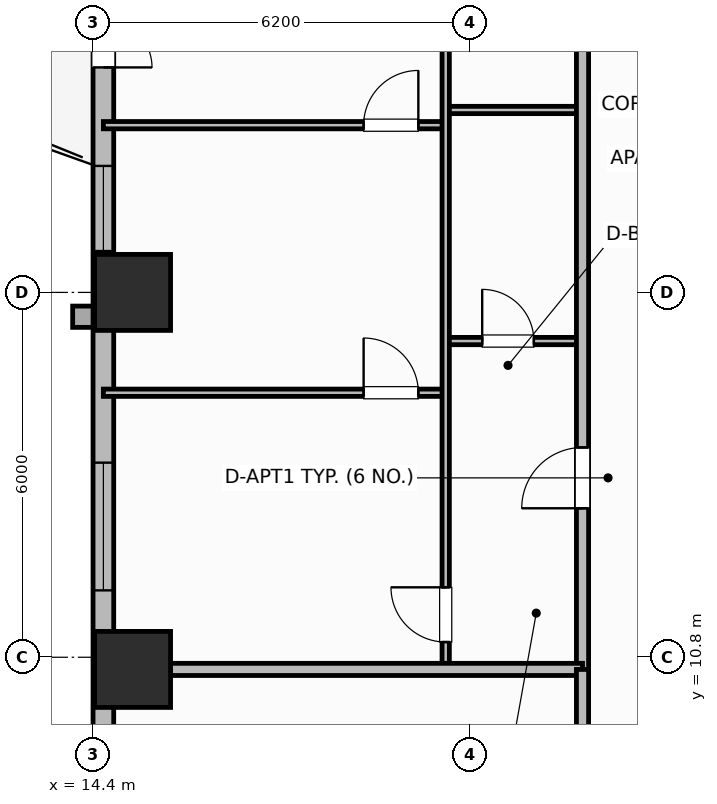
"""IFC4 building model, lengths in metres.
Left out: names, types, materials, properties, quantities, classifications, styles, units other than length and angle.
Written with IfcOpenShell. Run it as: python <this file> out.ifc"""

import sys

from ifc_helpers import new_model, si_unit, direction, frame, frame_2d, origin, origin_2d, place, context, subcontext, project, spatial, rectangle, extrude, element, fill, save


model = new_model("IFC4")
c1 = context("Model", 3, precision=1e-05, world=origin(), true_north=direction((0.0, 1.0)))
c2 = subcontext(c1, "Body", "Model", "MODEL_VIEW")
j1 = project(units=[si_unit("LENGTHUNIT", "METRE"), si_unit("PLANEANGLEUNIT", "RADIAN")], contexts=[c1])
p1 = place(None, origin())
s1 = spatial("IfcSite", under=j1, at=p1, CompositionType="ELEMENT")
p2 = place(p1, origin())
s2 = spatial("IfcBuilding", under=s1, at=p2, CompositionType="ELEMENT")
p3 = place(p2, frame((0.0, 0.0, 58.4)))
s3 = spatial("IfcBuildingStorey", under=s2, at=p3, CompositionType="ELEMENT", Elevation=58.4)
for number, where, z_axis, x_axis in (
    (1, (15.05, 10.6, 0.0), (0.0, 0.0, 1.0), (1.0, 0.0, 0.0)),
    (2, (15.05, 16.8, 0.0), (0.0, 0.0, 1.0), (1.0, 0.0, 0.0)),
):
    element("IfcColumn", number, at=place(p3, frame(where, z_axis=z_axis, x_axis=x_axis)), inside=s3, PredefinedType="COLUMN", context=c2, shape_type="SweptSolid", body=[
        extrude(rectangle(XDim=1.25, YDim=1.25, at=origin_2d()), origin(), (0.0, 0.0, 1.0), 3.7),
    ])
p4 = place(p3, frame((14.57, 23.8, 0.0), z_axis=(0.0, 0.0, 1.0), x_axis=(0.0, -1.0, 0.0)))
e3 = element("IfcWall", 3, at=p4, inside=s3, PredefinedType="SOLIDWALL", context=c2, shape_type="SweptSolid", body=[
    extrude(rectangle(XDim=14.8, YDim=0.34, at=frame_2d((7.4, 0.0))), origin(), (0.0, 0.0, 1.0), 2.7),
])
p5 = place(p4, frame((1.7, 0.0, 0.0)))
e4 = element("IfcOpeningElement", 4, at=p5, cuts=e3, PredefinedType="OPENING", context=c2, shape_type="SweptSolid", body=[
    extrude(rectangle(XDim=1.6, YDim=2.1, at=frame_2d((0.8, 1.05))), frame((0.0, 0.18, 0.0), z_axis=(0.0, -1.0, 0.0), x_axis=(1.0, 0.0, 0.0)), (0.0, 0.0, 1.0), 0.36),
])
p6 = place(p4, frame((4.92, 0.0, 0.69)))
e5 = element("IfcOpeningElement", 5, at=p6, cuts=e3, PredefinedType="OPENING", context=c2, shape_type="SweptSolid", body=[
    extrude(rectangle(XDim=1.4, YDim=1.85, at=frame_2d((0.7, 0.925))), frame((0.0, 0.18, 0.0), z_axis=(0.0, -1.0, 0.0), x_axis=(1.0, 0.0, 0.0)), (0.0, 0.0, 1.0), 0.36),
])
p7 = place(p4, frame((9.8, 0.0, 0.68)))
e6 = element("IfcOpeningElement", 6, at=p7, cuts=e3, PredefinedType="OPENING", context=c2, shape_type="SweptSolid", body=[
    extrude(rectangle(XDim=2.1, YDim=1.9, at=frame_2d((1.05, 0.95))), frame((0.0, 0.18, 0.0), z_axis=(0.0, -1.0, 0.0), x_axis=(1.0, 0.0, 0.0)), (0.0, 0.0, 1.0), 0.36),
])
p8 = place(p3, frame((20.2, 16.0, 0.0), z_axis=(0.0, 0.0, 1.0), x_axis=(1.0, 0.0, 0.0)))
e7 = element("IfcWall", 7, at=p8, inside=s3, PredefinedType="PARTITIONING", context=c2, shape_type="SweptSolid", body=[
    extrude(rectangle(XDim=2.25, YDim=0.12, at=frame_2d((1.125, 0.0))), origin(), (0.0, 0.0, 1.0), 2.53),
])
p9 = place(p8, frame((0.6, 0.0, 0.0)))
e8 = element("IfcOpeningElement", 8, at=p9, cuts=e7, PredefinedType="OPENING", context=c2, shape_type="SweptSolid", body=[
    extrude(rectangle(XDim=0.85, YDim=2.1, at=frame_2d((0.425, 1.05))), frame((0.0, 0.07, 0.0), z_axis=(0.0, -1.0, 0.0), x_axis=(1.0, 0.0, 0.0)), (0.0, 0.0, 1.0), 0.14),
])
p10 = place(p3, frame((20.2, 19.8, 0.0), z_axis=(0.0, 0.0, 1.0), x_axis=(1.0, 0.0, 0.0)))
e9 = element("IfcWall", 9, at=p10, inside=s3, PredefinedType="PARTITIONING", context=c2, shape_type="SweptSolid", body=[
    extrude(rectangle(XDim=2.25, YDim=0.12, at=frame_2d((1.125, 0.0))), origin(), (0.0, 0.0, 1.0), 2.53),
])
p11 = place(p3, frame((14.57, 15.15, 0.0), z_axis=(0.0, 0.0, 1.0), x_axis=(1.0, 0.0, 0.0)))
e10 = element("IfcWall", 10, at=p11, inside=s3, PredefinedType="PARTITIONING", context=c2, shape_type="SweptSolid", body=[
    extrude(rectangle(XDim=5.63, YDim=0.12, at=frame_2d((2.815, 0.0))), origin(), (0.0, 0.0, 1.0), 2.53),
])
p12 = place(p11, frame((4.28, 0.0, 0.0)))
e11 = element("IfcOpeningElement", 11, at=p12, cuts=e10, PredefinedType="OPENING", context=c2, shape_type="SweptSolid", body=[
    extrude(rectangle(XDim=0.9, YDim=2.1, at=frame_2d((0.45, 1.05))), frame((0.0, 0.07, 0.0), z_axis=(0.0, -1.0, 0.0), x_axis=(1.0, 0.0, 0.0)), (0.0, 0.0, 1.0), 0.14),
])
p13 = place(p3, frame((14.57, 19.55, 0.0), z_axis=(0.0, 0.0, 1.0), x_axis=(1.0, 0.0, 0.0)))
e12 = element("IfcWall", 12, at=p13, inside=s3, PredefinedType="PARTITIONING", context=c2, shape_type="SweptSolid", body=[
    extrude(rectangle(XDim=5.63, YDim=0.12, at=frame_2d((2.815, 0.0))), origin(), (0.0, 0.0, 1.0), 2.53),
])
p14 = place(p13, frame((4.28, 0.0, 0.0)))
e13 = element("IfcOpeningElement", 13, at=p14, cuts=e12, PredefinedType="OPENING", context=c2, shape_type="SweptSolid", body=[
    extrude(rectangle(XDim=0.9, YDim=2.1, at=frame_2d((0.45, 1.05))), frame((0.0, 0.07, 0.0), z_axis=(0.0, -1.0, 0.0), x_axis=(1.0, 0.0, 0.0)), (0.0, 0.0, 1.0), 0.14),
])
p15 = place(p3, frame((20.2, 10.64, 0.0), z_axis=(0.0, 0.0, 1.0), x_axis=(0.0, 1.0, 0.0)))
e14 = element("IfcWall", 14, at=p15, inside=s3, PredefinedType="PARTITIONING", context=c2, shape_type="SweptSolid", body=[
    extrude(rectangle(XDim=15.408, YDim=0.12, at=frame_2d((7.704, 0.0))), origin(), (0.0, 0.0, 1.0), 2.53),
])
p16 = place(p15, frame((0.41, 0.0, 0.0)))
e15 = element("IfcOpeningElement", 15, at=p16, cuts=e14, PredefinedType="OPENING", context=c2, shape_type="SweptSolid", body=[
    extrude(rectangle(XDim=0.9, YDim=2.1, at=frame_2d((0.45, 1.05))), frame((0.0, 0.07, 0.0), z_axis=(0.0, -1.0, 0.0), x_axis=(1.0, 0.0, 0.0)), (0.0, 0.0, 1.0), 0.14),
])
p17 = place(p15, frame((11.879, 0.0, 0.0)))
e16 = element("IfcOpeningElement", 16, at=p17, cuts=e14, PredefinedType="OPENING", context=c2, shape_type="SweptSolid", body=[
    extrude(rectangle(XDim=0.82, YDim=2.08, at=frame_2d((0.41, 1.04))), frame((0.0, 0.07, 0.0), z_axis=(0.0, -1.0, 0.0), x_axis=(1.0, 0.0, 0.0)), (0.0, 0.0, 1.0), 0.14),
])
p18 = place(p3, frame((22.45, 10.6, 0.0), z_axis=(0.0, 0.0, 1.0), x_axis=(0.0, 1.0, 0.0)))
e17 = element("IfcWall", 17, at=p18, inside=s3, PredefinedType="PARTITIONING", context=c2, shape_type="SweptSolid", body=[
    extrude(rectangle(XDim=35.2, YDim=0.2, at=frame_2d((17.6, 0.0))), origin(), (0.0, 0.0, 1.0), 2.53),
])
p19 = place(p18, frame((2.65, 0.0, 0.0)))
e18 = element("IfcOpeningElement", 18, at=p19, cuts=e17, PredefinedType="OPENING", context=c2, shape_type="SweptSolid", body=[
    extrude(rectangle(XDim=1.0, YDim=2.15, at=frame_2d((0.5, 1.075))), frame((0.0, 0.11, 0.0), z_axis=(0.0, -1.0, 0.0), x_axis=(1.0, 0.0, 0.0)), (0.0, 0.0, 1.0), 0.22),
])
p20 = place(p18, frame((19.438, 0.0, 0.0)))
e19 = element("IfcOpeningElement", 19, at=p20, cuts=e17, PredefinedType="OPENING", context=c2, shape_type="SweptSolid", body=[
    extrude(rectangle(XDim=1.0, YDim=2.15, at=frame_2d((0.5, 1.075))), frame((0.0, 0.11, 0.0), z_axis=(0.0, -1.0, 0.0), x_axis=(1.0, 0.0, 0.0)), (0.0, 0.0, 1.0), 0.22),
])
p21 = place(p3, frame((14.99, 10.6, 0.0), z_axis=(0.0, 0.0, 1.0), x_axis=(1.0, 0.0, 0.0)))
e20 = element("IfcWall", 20, at=p21, inside=s3, PredefinedType="PARTITIONING", context=c2, shape_type="SweptSolid", body=[
    extrude(rectangle(XDim=7.46, YDim=0.2, at=frame_2d((3.73, 0.0))), origin(), (0.0, 0.0, 1.0), 2.53),
])
p22 = place(p3, frame((22.45, 4.97, 0.0), z_axis=(0.0, 0.0, 1.0), x_axis=(0.0, 1.0, 0.0)))
e21 = element("IfcWall", 21, at=p22, inside=s3, PredefinedType="PARTITIONING", context=c2, shape_type="SweptSolid", body=[
    extrude(rectangle(XDim=5.63, YDim=0.2, at=frame_2d((2.815, 0.0))), origin(), (0.0, 0.0, 1.0), 2.53),
])
p23 = place(p5, origin())
e22 = element("IfcDoor", 22, at=p23, inside=s3, OperationType="DOUBLE_DOOR_SINGLE_SWING", PredefinedType="DOOR", context=c2, shape_type="SweptSolid", body=[
    extrude(rectangle(XDim=1.6, YDim=2.1, at=frame_2d((0.8, 1.05))), frame((0.0, 0.025, 0.0), z_axis=(0.0, -1.0, 0.0), x_axis=(1.0, 0.0, 0.0)), (0.0, 0.0, 1.0), 0.05),
])
fill(e4, e22)
p24 = place(p6, origin())
e23 = element("IfcWindow", 23, at=p24, inside=s3, PartitioningType="SINGLE_PANEL", PredefinedType="WINDOW", context=c2, shape_type="SweptSolid", body=[
    extrude(rectangle(XDim=1.4, YDim=1.85, at=frame_2d((0.7, 0.925))), frame((0.0, 0.03, 0.0), z_axis=(0.0, -1.0, 0.0), x_axis=(1.0, 0.0, 0.0)), (0.0, 0.0, 1.0), 0.06),
])
fill(e5, e23)
p25 = place(p7, origin())
e24 = element("IfcWindow", 24, at=p25, inside=s3, PartitioningType="SINGLE_PANEL", PredefinedType="WINDOW", context=c2, shape_type="SweptSolid", body=[
    extrude(rectangle(XDim=2.1, YDim=1.9, at=frame_2d((1.05, 0.95))), frame((0.0, 0.03, 0.0), z_axis=(0.0, -1.0, 0.0), x_axis=(1.0, 0.0, 0.0)), (0.0, 0.0, 1.0), 0.06),
])
fill(e6, e24)
p26 = place(p9, origin())
e25 = element("IfcDoor", 25, at=p26, inside=s3, OperationType="SINGLE_SWING_LEFT", PredefinedType="DOOR", context=c2, shape_type="SweptSolid", body=[
    extrude(rectangle(XDim=0.85, YDim=2.1, at=frame_2d((0.425, 1.05))), frame((0.0, 0.025, 0.0), z_axis=(0.0, -1.0, 0.0), x_axis=(1.0, 0.0, 0.0)), (0.0, 0.0, 1.0), 0.05),
])
fill(e8, e25)
p27 = place(p12, origin())
e26 = element("IfcDoor", 26, at=p27, inside=s3, OperationType="SINGLE_SWING_LEFT", PredefinedType="DOOR", context=c2, shape_type="SweptSolid", body=[
    extrude(rectangle(XDim=0.9, YDim=2.1, at=frame_2d((0.45, 1.05))), frame((0.0, 0.025, 0.0), z_axis=(0.0, -1.0, 0.0), x_axis=(1.0, 0.0, 0.0)), (0.0, 0.0, 1.0), 0.05),
])
fill(e11, e26)
p28 = place(p14, origin())
e27 = element("IfcDoor", 27, at=p28, inside=s3, OperationType="SINGLE_SWING_RIGHT", PredefinedType="DOOR", context=c2, shape_type="SweptSolid", body=[
    extrude(rectangle(XDim=0.9, YDim=2.1, at=frame_2d((0.45, 1.05))), frame((0.0, 0.025, 0.0), z_axis=(0.0, -1.0, 0.0), x_axis=(1.0, 0.0, 0.0)), (0.0, 0.0, 1.0), 0.05),
])
fill(e13, e27)
p29 = place(p16, origin())
e28 = element("IfcDoor", 28, at=p29, inside=s3, OperationType="SINGLE_SWING_RIGHT", PredefinedType="DOOR", context=c2, shape_type="SweptSolid", body=[
    extrude(rectangle(XDim=0.9, YDim=2.1, at=frame_2d((0.45, 1.05))), frame((0.0, 0.025, 0.0), z_axis=(0.0, -1.0, 0.0), x_axis=(1.0, 0.0, 0.0)), (0.0, 0.0, 1.0), 0.05),
])
fill(e15, e28)
p30 = place(p19, origin())
e29 = element("IfcDoor", 29, at=p30, inside=s3, OperationType="SINGLE_SWING_LEFT", PredefinedType="DOOR", context=c2, shape_type="SweptSolid", body=[
    extrude(rectangle(XDim=1.0, YDim=2.15, at=frame_2d((0.5, 1.075))), frame((0.0, 0.025, 0.0), z_axis=(0.0, -1.0, 0.0), x_axis=(1.0, 0.0, 0.0)), (0.0, 0.0, 1.0), 0.05),
])
fill(e18, e29)
save(model, sys.argv[1])
